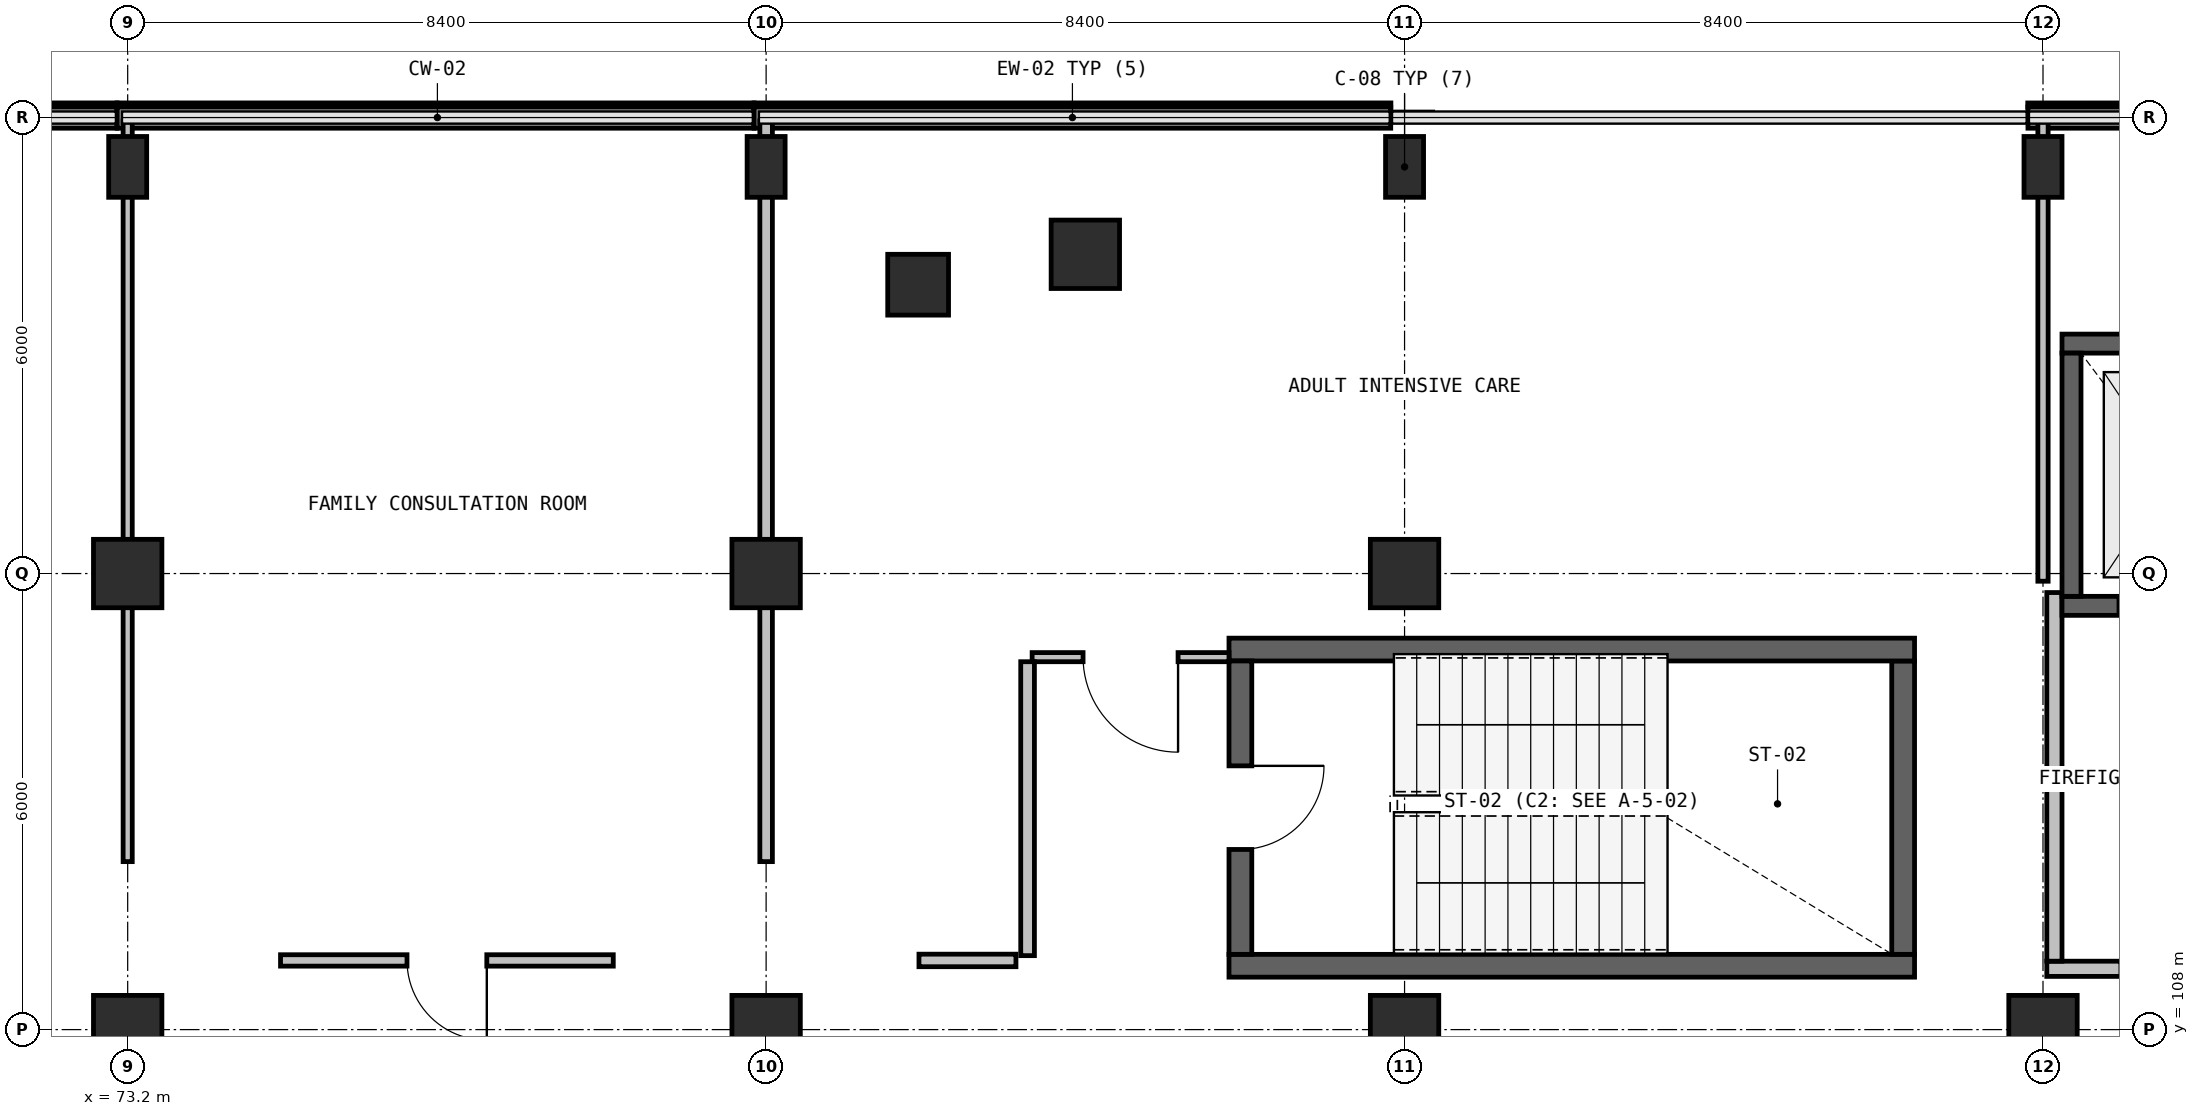
"""IFC4 building model, lengths in metres.
Left out: names, types, materials, properties, quantities, classifications, styles, units other than length and angle.
Written with IfcOpenShell. Run it as: python <this file> out.ifc"""

import sys

from ifc_helpers import new_model, si_unit, direction, frame, frame_2d, origin, origin_2d, place, context, subcontext, project, spatial, rectangle, extrude, element, fill, save


model = new_model("IFC4")
c1 = context("Model", 3, precision=1e-05, world=origin(), true_north=direction((0.0, 1.0)))
c2 = subcontext(c1, "Body", "Model", "MODEL_VIEW")
j1 = project(units=[si_unit("LENGTHUNIT", "METRE"), si_unit("PLANEANGLEUNIT", "RADIAN")], contexts=[c1])
p1 = place(None, origin())
s1 = spatial("IfcSite", under=j1, at=p1, CompositionType="ELEMENT")
p2 = place(p1, origin())
s2 = spatial("IfcBuilding", under=s1, at=p2, CompositionType="ELEMENT")
p3 = place(p2, frame((0.0, 0.0, 5.4)))
s3 = spatial("IfcBuildingStorey", under=s2, at=p3, CompositionType="ELEMENT", Elevation=5.4)
p4 = place(p3, frame((83.6, 117.8, 0.0), z_axis=(0.0, 0.0, 1.0), x_axis=(1.0, 0.0, 0.0)))
e1 = element("IfcColumn", 1, at=p4, inside=s3, PredefinedType="COLUMN", context=c2, shape_type="SweptSolid", body=[
    extrude(rectangle(XDim=0.8, YDim=0.8, at=origin_2d()), origin(), (0.0, 0.0, 1.0), 4.8),
])
for number, where, z_axis, x_axis in (
    (2, (85.8, 118.2, 0.0), (0.0, 0.0, 1.0), (1.0, 0.0, 0.0)),
    (3, (73.2, 108.0, 0.0), (0.0, 0.0, 1.0), (1.0, 0.0, 0.0)),
    (4, (73.2, 114.0, 0.0), (0.0, 0.0, 1.0), (1.0, 0.0, 0.0)),
):
    element("IfcColumn", number, at=place(p3, frame(where, z_axis=z_axis, x_axis=x_axis)), inside=s3, PredefinedType="COLUMN", context=c2, shape_type="SweptSolid", body=[
        extrude(rectangle(XDim=0.9, YDim=0.9, at=origin_2d()), origin(), (0.0, 0.0, 1.0), 4.8),
    ])
p5 = place(p3, frame((73.2, 119.35, 0.0), z_axis=(0.0, 0.0, 1.0), x_axis=(1.0, 0.0, 0.0)))
e5 = element("IfcColumn", 5, at=p5, inside=s3, PredefinedType="COLUMN", context=c2, shape_type="SweptSolid", body=[
    extrude(rectangle(XDim=0.5, YDim=0.8, at=origin_2d()), origin(), (0.0, 0.0, 1.0), 4.8),
])
for number, where, z_axis, x_axis in (
    (6, (81.6, 108.0, 0.0), (0.0, 0.0, 1.0), (1.0, 0.0, 0.0)),
    (7, (81.6, 114.0, 0.0), (0.0, 0.0, 1.0), (1.0, 0.0, 0.0)),
):
    element("IfcColumn", number, at=place(p3, frame(where, z_axis=z_axis, x_axis=x_axis)), inside=s3, PredefinedType="COLUMN", context=c2, shape_type="SweptSolid", body=[
        extrude(rectangle(XDim=0.9, YDim=0.9, at=origin_2d()), origin(), (0.0, 0.0, 1.0), 4.8),
    ])
p6 = place(p3, frame((81.6, 119.35, 0.0), z_axis=(0.0, 0.0, 1.0), x_axis=(1.0, 0.0, 0.0)))
e8 = element("IfcColumn", 8, at=p6, inside=s3, PredefinedType="COLUMN", context=c2, shape_type="SweptSolid", body=[
    extrude(rectangle(XDim=0.5, YDim=0.8, at=origin_2d()), origin(), (0.0, 0.0, 1.0), 4.8),
])
for number, where, z_axis, x_axis in (
    (9, (90.0, 108.0, 0.0), (0.0, 0.0, 1.0), (1.0, 0.0, 0.0)),
    (10, (90.0, 114.0, 0.0), (0.0, 0.0, 1.0), (1.0, 0.0, 0.0)),
):
    element("IfcColumn", number, at=place(p3, frame(where, z_axis=z_axis, x_axis=x_axis)), inside=s3, PredefinedType="COLUMN", context=c2, shape_type="SweptSolid", body=[
        extrude(rectangle(XDim=0.9, YDim=0.9, at=origin_2d()), origin(), (0.0, 0.0, 1.0), 4.8),
    ])
p7 = place(p3, frame((90.0, 119.35, 0.0), z_axis=(0.0, 0.0, 1.0), x_axis=(1.0, 0.0, 0.0)))
e11 = element("IfcColumn", 11, at=p7, inside=s3, PredefinedType="COLUMN", context=c2, shape_type="SweptSolid", body=[
    extrude(rectangle(XDim=0.5, YDim=0.8, at=origin_2d()), origin(), (0.0, 0.0, 1.0), 4.8),
])
p8 = place(p3, frame((98.4, 108.0, 0.0), z_axis=(0.0, 0.0, 1.0), x_axis=(1.0, 0.0, 0.0)))
e12 = element("IfcColumn", 12, at=p8, inside=s3, PredefinedType="COLUMN", context=c2, shape_type="SweptSolid", body=[
    extrude(rectangle(XDim=0.9, YDim=0.9, at=origin_2d()), origin(), (0.0, 0.0, 1.0), 4.8),
])
p9 = place(p3, frame((98.4, 119.35, 0.0), z_axis=(0.0, 0.0, 1.0), x_axis=(1.0, 0.0, 0.0)))
e13 = element("IfcColumn", 13, at=p9, inside=s3, PredefinedType="COLUMN", context=c2, shape_type="SweptSolid", body=[
    extrude(rectangle(XDim=0.5, YDim=0.8, at=origin_2d()), origin(), (0.0, 0.0, 1.0), 4.8),
])
p10 = place(p3, frame((64.682, 119.999, 0.0), z_axis=(0.0, 0.0, 1.0), x_axis=(1.0, 0.0, 0.0)))
e14 = element("IfcWall", 14, at=p10, inside=s3, PredefinedType="SOLIDWALL", context=c2, shape_type="SweptSolid", body=[
    extrude(rectangle(XDim=8.376, YDim=0.28, at=frame_2d((4.188, 0.0))), origin(), (0.0, 0.0, 1.0), 0.94),
])
p11 = place(p3, frame((73.062, 119.999, 0.0), z_axis=(0.0, 0.0, 1.0), x_axis=(1.0, 0.0, 0.0)))
e15 = element("IfcWall", 15, at=p11, inside=s3, PredefinedType="SOLIDWALL", context=c2, shape_type="SweptSolid", body=[
    extrude(rectangle(XDim=8.376, YDim=0.28, at=frame_2d((4.188, 0.0))), origin(), (0.0, 0.0, 1.0), 0.94),
])
p12 = place(p3, frame((81.442, 119.999, 0.0), z_axis=(0.0, 0.0, 1.0), x_axis=(1.0, 0.0, 0.0)))
e16 = element("IfcWall", 16, at=p12, inside=s3, PredefinedType="SOLIDWALL", context=c2, shape_type="SweptSolid", body=[
    extrude(rectangle(XDim=8.376, YDim=0.28, at=frame_2d((4.188, 0.0))), origin(), (0.0, 0.0, 1.0), 0.94),
])
p13 = place(p3, frame((98.202, 119.999, 0.0), z_axis=(0.0, 0.0, 1.0), x_axis=(0.999999993202, 0.000116604477, 0.0)))
e17 = element("IfcWall", 17, at=p13, inside=s3, PredefinedType="SOLIDWALL", context=c2, shape_type="SweptSolid", body=[
    extrude(rectangle(XDim=8.375, YDim=0.28, at=frame_2d((4.188, 0.0))), origin(), (0.0, 0.0, 1.0), 0.94),
])
p14 = place(p3, frame((87.69, 108.84, 0.0), z_axis=(0.0, 0.0, 1.0), x_axis=(1.0, 0.0, 0.0)))
e18 = element("IfcWall", 18, at=p14, inside=s3, PredefinedType="SHEAR", context=c2, shape_type="SweptSolid", body=[
    extrude(rectangle(XDim=9.02, YDim=0.3, at=frame_2d((4.51, 0.0))), origin(), (0.0, 0.0, 1.0), 4.445),
])
p15 = place(p3, frame((96.56, 108.99, 0.0), z_axis=(0.0, 0.0, 1.0), x_axis=(0.0, 1.0, 0.0)))
e19 = element("IfcWall", 19, at=p15, inside=s3, PredefinedType="SHEAR", context=c2, shape_type="SweptSolid", body=[
    extrude(rectangle(XDim=3.86, YDim=0.3, at=frame_2d((1.93, 0.0))), origin(), (0.0, 0.0, 1.0), 4.445),
])
p16 = place(p3, frame((96.71, 113.0, 0.0), z_axis=(0.0, 0.0, 1.0), x_axis=(-1.0, 0.0, 0.0)))
e20 = element("IfcWall", 20, at=p16, inside=s3, PredefinedType="SHEAR", context=c2, shape_type="SweptSolid", body=[
    extrude(rectangle(XDim=9.02, YDim=0.3, at=frame_2d((4.51, 0.0))), origin(), (0.0, 0.0, 1.0), 4.445),
])
p17 = place(p3, frame((87.84, 112.85, 0.0), z_axis=(0.0, 0.0, 1.0), x_axis=(0.0, -1.0, 0.0)))
e21 = element("IfcWall", 21, at=p17, inside=s3, PredefinedType="SHEAR", context=c2, shape_type="SweptSolid", body=[
    extrude(rectangle(XDim=3.86, YDim=0.3, at=frame_2d((1.93, 0.0))), origin(), (0.0, 0.0, 1.0), 4.445),
])
p18 = place(p17, frame((1.38, 0.0, 0.0)))
e22 = element("IfcOpeningElement", 22, at=p18, cuts=e21, PredefinedType="OPENING", context=c2, shape_type="SweptSolid", body=[
    extrude(rectangle(XDim=1.1, YDim=2.15, at=frame_2d((0.55, 1.075))), frame((0.0, 0.16, 0.0), z_axis=(0.0, -1.0, 0.0), x_axis=(1.0, 0.0, 0.0)), (0.0, 0.0, 1.0), 0.32),
])
p19 = place(p3, frame((98.45, 108.8, 0.0), z_axis=(0.0, 0.0, 1.0), x_axis=(1.0, 0.0, 0.0)))
e23 = element("IfcWall", 23, at=p19, inside=s3, PredefinedType="SOLIDWALL", context=c2, shape_type="SweptSolid", body=[
    extrude(rectangle(XDim=3.3, YDim=0.2, at=frame_2d((1.65, 0.0))), origin(), (0.0, 0.0, 1.0), 4.445),
])
p20 = place(p19, frame((0.975, 0.0, 0.0)))
e24 = element("IfcOpeningElement", 24, at=p20, cuts=e23, PredefinedType="OPENING", context=c2, shape_type="SweptSolid", body=[
    extrude(rectangle(XDim=1.15, YDim=2.15, at=frame_2d((0.575, 1.075))), frame((0.0, 0.11, 0.0), z_axis=(0.0, -1.0, 0.0), x_axis=(1.0, 0.0, 0.0)), (0.0, 0.0, 1.0), 0.22),
])
p21 = place(p3, frame((98.55, 113.75, 0.0), z_axis=(0.0, 0.0, 1.0), x_axis=(0.0, -1.0, 0.0)))
e25 = element("IfcWall", 25, at=p21, inside=s3, PredefinedType="SOLIDWALL", context=c2, shape_type="SweptSolid", body=[
    extrude(rectangle(XDim=4.85, YDim=0.2, at=frame_2d((2.425, 0.0))), origin(), (0.0, 0.0, 1.0), 3.695),
])
p22 = place(p3, frame((98.65, 113.575, 0.0), z_axis=(0.0, 0.0, 1.0), x_axis=(1.0, 0.0, 0.0)))
e26 = element("IfcWall", 26, at=p22, inside=s3, PredefinedType="SHEAR", context=c2, shape_type="SweptSolid", body=[
    extrude(rectangle(XDim=2.9, YDim=0.25, at=frame_2d((1.45, 0.0))), origin(), (0.0, 0.0, 1.0), 4.445),
])
p23 = place(p22, frame((0.75, 0.0, 0.0)))
e27 = element("IfcOpeningElement", 27, at=p23, cuts=e26, PredefinedType="OPENING", context=c2, shape_type="SweptSolid", body=[
    extrude(rectangle(XDim=1.4, YDim=2.15, at=frame_2d((0.7, 1.075))), frame((0.0, 0.135, 0.0), z_axis=(0.0, -1.0, 0.0), x_axis=(1.0, 0.0, 0.0)), (0.0, 0.0, 1.0), 0.27),
])
p24 = place(p3, frame((101.55, 117.025, 0.0), z_axis=(0.0, 0.0, 1.0), x_axis=(-1.0, 0.0, 0.0)))
e28 = element("IfcWall", 28, at=p24, inside=s3, PredefinedType="SHEAR", context=c2, shape_type="SweptSolid", body=[
    extrude(rectangle(XDim=2.9, YDim=0.25, at=frame_2d((1.45, 0.0))), origin(), (0.0, 0.0, 1.0), 4.445),
])
p25 = place(p3, frame((98.775, 116.9, 0.0), z_axis=(0.0, 0.0, 1.0), x_axis=(0.0, -1.0, 0.0)))
e29 = element("IfcWall", 29, at=p25, inside=s3, PredefinedType="SHEAR", context=c2, shape_type="SweptSolid", body=[
    extrude(rectangle(XDim=3.2, YDim=0.25, at=frame_2d((1.6, 0.0))), origin(), (0.0, 0.0, 1.0), 4.445),
])
p26 = place(p3, frame((73.2, 119.957, 0.0), z_axis=(0.0, 0.0, 1.0), x_axis=(0.0, -1.0, 0.0)))
e30 = element("IfcWall", 30, at=p26, inside=s3, PredefinedType="PARTITIONING", context=c2, shape_type="SweptSolid", body=[
    extrude(rectangle(XDim=9.747, YDim=0.12, at=frame_2d((4.874, 0.0))), origin(), (0.0, 0.0, 1.0), 3.695),
])
p27 = place(p3, frame((81.6, 119.957, 0.0), z_axis=(0.0, 0.0, 1.0), x_axis=(0.0, -1.0, 0.0)))
e31 = element("IfcWall", 31, at=p27, inside=s3, PredefinedType="PARTITIONING", context=c2, shape_type="SweptSolid", body=[
    extrude(rectangle(XDim=9.747, YDim=0.165, at=frame_2d((4.874, 0.0))), origin(), (0.0, 0.0, 1.0), 3.695),
])
p28 = place(p3, frame((79.589, 108.91, 0.0), z_axis=(0.0, 0.0, 1.0), x_axis=(-1.0, 0.0, 0.0)))
e32 = element("IfcWall", 32, at=p28, inside=s3, PredefinedType="PARTITIONING", context=c2, shape_type="SweptSolid", body=[
    extrude(rectangle(XDim=4.378, YDim=0.15, at=frame_2d((2.189, 0.0))), origin(), (0.0, 0.0, 1.0), 4.445),
])
p29 = place(p28, frame((1.664, 0.0, 0.0)))
e33 = element("IfcOpeningElement", 33, at=p29, cuts=e32, PredefinedType="OPENING", context=c2, shape_type="SweptSolid", body=[
    extrude(rectangle(XDim=1.05, YDim=2.15, at=frame_2d((0.525, 1.075))), frame((0.0, 0.085, 0.0), z_axis=(0.0, -1.0, 0.0), x_axis=(1.0, 0.0, 0.0)), (0.0, 0.0, 1.0), 0.17),
])
p30 = place(p3, frame((98.4, 119.957, 0.0), z_axis=(0.0, 0.0, 1.0), x_axis=(0.0, -1.0, 0.0)))
e34 = element("IfcWall", 34, at=p30, inside=s3, PredefinedType="PARTITIONING", context=c2, shape_type="SweptSolid", body=[
    extrude(rectangle(XDim=6.058, YDim=0.135, at=frame_2d((3.029, 0.0))), origin(), (0.0, 0.0, 1.0), 3.695),
])
p31 = place(p3, frame((87.69, 112.9, 0.0), z_axis=(0.0, 0.0, 1.0), x_axis=(-1.0, 0.0, 0.0)))
e35 = element("IfcWall", 35, at=p31, inside=s3, PredefinedType="PARTITIONING", context=c2, shape_type="SweptSolid", body=[
    extrude(rectangle(XDim=2.59, YDim=0.12, at=frame_2d((1.295, 0.0))), origin(), (0.0, 0.0, 1.0), 4.445),
])
p32 = place(p31, frame((0.67, 0.0, 0.0)))
e36 = element("IfcOpeningElement", 36, at=p32, cuts=e35, PredefinedType="OPENING", context=c2, shape_type="SweptSolid", body=[
    extrude(rectangle(XDim=1.25, YDim=2.15, at=frame_2d((0.625, 1.075))), frame((0.0, 0.07, 0.0), z_axis=(0.0, -1.0, 0.0), x_axis=(1.0, 0.0, 0.0)), (0.0, 0.0, 1.0), 0.14),
])
p33 = place(p3, frame((85.04, 112.84, 0.0), z_axis=(0.0, 0.0, 1.0), x_axis=(0.0, -1.0, 0.0)))
e37 = element("IfcWall", 37, at=p33, inside=s3, PredefinedType="PARTITIONING", context=c2, shape_type="SweptSolid", body=[
    extrude(rectangle(XDim=3.867, YDim=0.18, at=frame_2d((1.934, 0.0))), origin(), (0.0, 0.0, 1.0), 4.445),
])
p34 = place(p3, frame((84.887, 108.91, 0.0), z_axis=(0.0, 0.0, 1.0), x_axis=(-1.0, 0.0, 0.0)))
e38 = element("IfcWall", 38, at=p34, inside=s3, PredefinedType="PARTITIONING", context=c2, shape_type="SweptSolid", body=[
    extrude(rectangle(XDim=1.276, YDim=0.165, at=frame_2d((0.638, 0.0))), origin(), (0.0, 0.0, 1.0), 4.445),
])
p35 = place(p18, origin())
e39 = element("IfcDoor", 39, at=p35, inside=s3, OperationType="SINGLE_SWING_RIGHT", PredefinedType="DOOR", context=c2, shape_type="SweptSolid", body=[
    extrude(rectangle(XDim=1.1, YDim=2.15, at=frame_2d((0.55, 1.075))), frame((0.0, 0.025, 0.0), z_axis=(0.0, -1.0, 0.0), x_axis=(1.0, 0.0, 0.0)), (0.0, 0.0, 1.0), 0.05),
])
fill(e22, e39)
p36 = place(p29, origin())
e40 = element("IfcDoor", 40, at=p36, inside=s3, OperationType="SINGLE_SWING_LEFT", PredefinedType="DOOR", context=c2, shape_type="SweptSolid", body=[
    extrude(rectangle(XDim=1.05, YDim=2.15, at=frame_2d((0.525, 1.075))), frame((0.0, 0.025, 0.0), z_axis=(0.0, -1.0, 0.0), x_axis=(1.0, 0.0, 0.0)), (0.0, 0.0, 1.0), 0.05),
])
fill(e33, e40)
p37 = place(p32, origin())
e41 = element("IfcDoor", 41, at=p37, inside=s3, OperationType="SINGLE_SWING_RIGHT", PredefinedType="DOOR", context=c2, shape_type="SweptSolid", body=[
    extrude(rectangle(XDim=1.25, YDim=2.15, at=frame_2d((0.625, 1.075))), frame((0.0, 0.025, 0.0), z_axis=(0.0, -1.0, 0.0), x_axis=(1.0, 0.0, 0.0)), (0.0, 0.0, 1.0), 0.05),
])
fill(e36, e41)
save(model, sys.argv[1])
